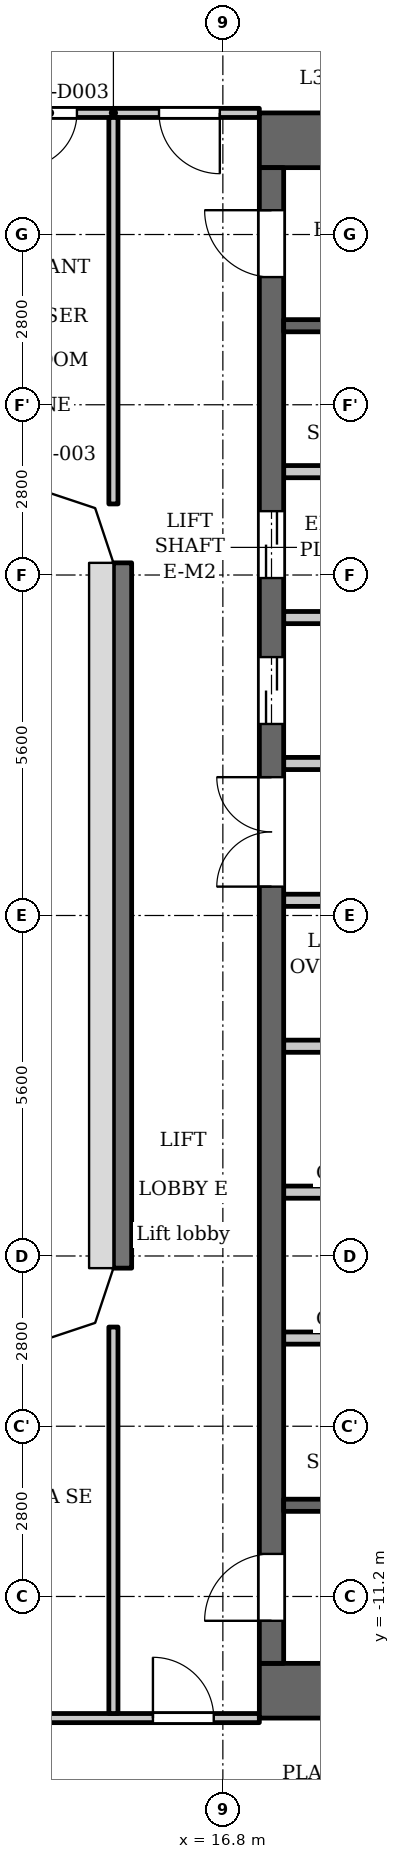
"""IFC4 building model, lengths in metres.
Left out: names, types, materials, properties, quantities, classifications, styles, units other than length and angle.
Written with IfcOpenShell. Run it as: python <this file> out.ifc"""

import sys

from ifc_helpers import new_model, si_unit, direction, frame, frame_2d, origin, place, context, subcontext, project, spatial, polyline, rectangle, outline, extrude, element, fill, save


model = new_model("IFC4")
c1 = context("Model", 3, precision=1e-05, world=origin(), true_north=direction((0.0, 1.0)))
c2 = subcontext(c1, "Body", "Model", "MODEL_VIEW")
j1 = project(units=[si_unit("LENGTHUNIT", "METRE"), si_unit("PLANEANGLEUNIT", "RADIAN")], contexts=[c1])
p1 = place(None, origin())
s1 = spatial("IfcSite", under=j1, at=p1, CompositionType="ELEMENT")
p2 = place(p1, origin())
s2 = spatial("IfcBuilding", under=s1, at=p2, CompositionType="ELEMENT")
p3 = place(p2, frame((0.0, 0.0, 130.7)))
s3 = spatial("IfcBuildingStorey", under=s2, at=p3, CompositionType="ELEMENT", Elevation=130.7)
p4 = place(p3, frame((15.15, 5.8, 0.0), z_axis=(0.0, 0.0, 1.0), x_axis=(0.0, -1.0, 0.0)))
e1 = element("IfcWall", 1, at=p4, inside=s3, PredefinedType="SOLIDWALL", context=c2, shape_type="SweptSolid", body=[
    extrude(rectangle(XDim=11.6, YDim=0.3, at=frame_2d((5.8, 0.0))), origin(), (0.0, 0.0, 1.0), 5.1),
])
for number, where, z_axis, x_axis in (
    (2, (17.4, 12.75, 0.0), (0.0, 0.0, 1.0), (1.0, 0.0, 0.0)),
    (3, (17.4, -12.75, 0.0), (0.0, 0.0, 1.0), (1.0, 0.0, 0.0)),
):
    element("IfcWall", number, at=place(p3, frame(where, z_axis=z_axis, x_axis=x_axis)), inside=s3, PredefinedType="SHEAR", context=c2, shape_type="SweptSolid", body=[
        extrude(rectangle(XDim=10.4, YDim=0.9, at=frame_2d((5.2, 0.0))), origin(), (0.0, 0.0, 1.0), 5.1),
    ])
p5 = place(p3, frame((17.6, -12.3, 0.0), z_axis=(0.0, 0.0, 1.0), x_axis=(0.0, 1.0, 0.0)))
e4 = element("IfcWall", 4, at=p5, inside=s3, PredefinedType="SHEAR", context=c2, shape_type="SweptSolid", body=[
    extrude(rectangle(XDim=24.6, YDim=0.4, at=frame_2d((12.3, 0.0))), origin(), (0.0, 0.0, 1.0), 5.1),
])
p6 = place(p5, frame((15.45, 0.0, 0.0)))
e5 = element("IfcOpeningElement", 5, at=p6, cuts=e4, PredefinedType="OPENING", context=c2, shape_type="SweptSolid", body=[
    extrude(rectangle(XDim=1.1, YDim=2.1, at=frame_2d((0.55, 1.05))), frame((0.0, 0.21, 0.0), z_axis=(0.0, -1.0, 0.0), x_axis=(1.0, 0.0, 0.0)), (0.0, 0.0, 1.0), 0.42),
])
p7 = place(p5, frame((17.85, 0.0, 0.0)))
e6 = element("IfcOpeningElement", 6, at=p7, cuts=e4, PredefinedType="OPENING", context=c2, shape_type="SweptSolid", body=[
    extrude(rectangle(XDim=1.1, YDim=2.1, at=frame_2d((0.55, 1.05))), frame((0.0, 0.21, 0.0), z_axis=(0.0, -1.0, 0.0), x_axis=(1.0, 0.0, 0.0)), (0.0, 0.0, 1.0), 0.42),
])
p8 = place(p5, frame((22.8, 0.0, 0.0)))
e7 = element("IfcOpeningElement", 7, at=p8, cuts=e4, PredefinedType="OPENING", context=c2, shape_type="SweptSolid", body=[
    extrude(rectangle(XDim=1.1, YDim=2.1, at=frame_2d((0.55, 1.05))), frame((0.0, 0.21, 0.0), z_axis=(0.0, -1.0, 0.0), x_axis=(1.0, 0.0, 0.0)), (0.0, 0.0, 1.0), 0.42),
])
p9 = place(p5, frame((0.7, 0.0, 0.0)))
e8 = element("IfcOpeningElement", 8, at=p9, cuts=e4, PredefinedType="OPENING", context=c2, shape_type="SweptSolid", body=[
    extrude(rectangle(XDim=1.1, YDim=2.1, at=frame_2d((0.55, 1.05))), frame((0.0, 0.21, 0.0), z_axis=(0.0, -1.0, 0.0), x_axis=(1.0, 0.0, 0.0)), (0.0, 0.0, 1.0), 0.42),
])
p10 = place(p5, frame((12.775, 0.0, 0.0)))
e9 = element("IfcOpeningElement", 9, at=p10, cuts=e4, PredefinedType="OPENING", context=c2, shape_type="SweptSolid", body=[
    extrude(rectangle(XDim=1.8, YDim=2.1, at=frame_2d((0.9, 1.05))), frame((0.0, 0.21, 0.0), z_axis=(0.0, -1.0, 0.0), x_axis=(1.0, 0.0, 0.0)), (0.0, 0.0, 1.0), 0.42),
])
p11 = place(p3, frame((17.8, -9.7, 0.0), z_axis=(0.0, 0.0, 1.0), x_axis=(1.0, 0.0, 0.0)))
e10 = element("IfcWall", 10, at=p11, inside=s3, PredefinedType="SHEAR", context=c2, shape_type="SweptSolid", body=[
    extrude(rectangle(XDim=8.3, YDim=0.2, at=frame_2d((4.15, 0.0))), origin(), (0.0, 0.0, 1.0), 5.1),
])
p12 = place(p11, frame((0.85, 0.0, 0.0)))
e11 = element("IfcOpeningElement", 11, at=p12, cuts=e10, PredefinedType="OPENING", context=c2, shape_type="SweptSolid", body=[
    extrude(rectangle(XDim=1.1, YDim=2.1, at=frame_2d((0.55, 1.05))), frame((0.0, 0.11, 0.0), z_axis=(0.0, -1.0, 0.0), x_axis=(1.0, 0.0, 0.0)), (0.0, 0.0, 1.0), 0.22),
])
p13 = place(p11, frame((3.75, 0.0, 0.0)))
e12 = element("IfcOpeningElement", 12, at=p13, cuts=e10, PredefinedType="OPENING", context=c2, shape_type="SweptSolid", body=[
    extrude(rectangle(XDim=1.1, YDim=2.1, at=frame_2d((0.55, 1.05))), frame((0.0, 0.11, 0.0), z_axis=(0.0, -1.0, 0.0), x_axis=(1.0, 0.0, 0.0)), (0.0, 0.0, 1.0), 0.22),
])
for number, where, z_axis, x_axis in (
    (13, (17.8, -6.95, 0.0), (0.0, 0.0, 1.0), (1.0, 0.0, 0.0)),
    (14, (17.8, -4.55, 0.0), (0.0, 0.0, 1.0), (1.0, 0.0, 0.0)),
    (15, (17.8, -2.15, 0.0), (0.0, 0.0, 1.0), (1.0, 0.0, 0.0)),
):
    element("IfcWall", number, at=place(p3, frame(where, z_axis=z_axis, x_axis=x_axis)), inside=s3, PredefinedType="PARTITIONING", context=c2, shape_type="SweptSolid", body=[
        extrude(rectangle(XDim=2.8, YDim=0.2, at=frame_2d((1.4, 0.0))), origin(), (0.0, 0.0, 1.0), 5.1),
    ])
for number, where, z_axis, x_axis in (
    (16, (17.8, 0.25, 0.0), (0.0, 0.0, 1.0), (1.0, 0.0, 0.0)),
    (17, (17.8, 2.5, 0.0), (0.0, 0.0, 1.0), (1.0, 0.0, 0.0)),
):
    element("IfcWall", number, at=place(p3, frame(where, z_axis=z_axis, x_axis=x_axis)), inside=s3, PredefinedType="PARTITIONING", context=c2, shape_type="SweptSolid", body=[
        extrude(rectangle(XDim=3.0, YDim=0.2, at=frame_2d((1.5, 0.0))), origin(), (0.0, 0.0, 1.0), 5.1),
    ])
for number, where, z_axis, x_axis in (
    (18, (17.8, 4.9, 0.0), (0.0, 0.0, 1.0), (1.0, 0.0, 0.0)),
    (19, (17.8, 7.3, 0.0), (0.0, 0.0, 1.0), (1.0, 0.0, 0.0)),
):
    element("IfcWall", number, at=place(p3, frame(where, z_axis=z_axis, x_axis=x_axis)), inside=s3, PredefinedType="PARTITIONING", context=c2, shape_type="SweptSolid", body=[
        extrude(rectangle(XDim=2.8, YDim=0.2, at=frame_2d((1.4, 0.0))), origin(), (0.0, 0.0, 1.0), 5.1),
    ])
p14 = place(p3, frame((17.8, 9.7, 0.0), z_axis=(0.0, 0.0, 1.0), x_axis=(1.0, 0.0, 0.0)))
e20 = element("IfcWall", 20, at=p14, inside=s3, PredefinedType="SHEAR", context=c2, shape_type="SweptSolid", body=[
    extrude(rectangle(XDim=8.3, YDim=0.2, at=frame_2d((4.15, 0.0))), origin(), (0.0, 0.0, 1.0), 5.1),
])
p15 = place(p14, frame((0.85, 0.0, 0.0)))
e21 = element("IfcOpeningElement", 21, at=p15, cuts=e20, PredefinedType="OPENING", context=c2, shape_type="SweptSolid", body=[
    extrude(rectangle(XDim=1.1, YDim=2.1, at=frame_2d((0.55, 1.05))), frame((0.0, 0.11, 0.0), z_axis=(0.0, -1.0, 0.0), x_axis=(1.0, 0.0, 0.0)), (0.0, 0.0, 1.0), 0.22),
])
p16 = place(p14, frame((3.75, 0.0, 0.0)))
e22 = element("IfcOpeningElement", 22, at=p16, cuts=e20, PredefinedType="OPENING", context=c2, shape_type="SweptSolid", body=[
    extrude(rectangle(XDim=1.1, YDim=2.1, at=frame_2d((0.55, 1.05))), frame((0.0, 0.11, 0.0), z_axis=(0.0, -1.0, 0.0), x_axis=(1.0, 0.0, 0.0)), (0.0, 0.0, 1.0), 0.22),
])
p17 = place(p3, frame((11.52, -13.2, 0.0), z_axis=(0.0, 0.0, 1.0), x_axis=(1.0, 0.0, 0.0)))
e23 = element("IfcWall", 23, at=p17, inside=s3, PredefinedType="PARTITIONING", context=c2, shape_type="SweptSolid", body=[
    extrude(rectangle(XDim=5.88, YDim=0.15, at=frame_2d((2.94, 0.0))), origin(), (0.0, 0.0, 1.0), 5.1),
])
p18 = place(p17, frame((4.13, 0.0, 0.0)))
e24 = element("IfcOpeningElement", 24, at=p18, cuts=e23, PredefinedType="OPENING", context=c2, shape_type="SweptSolid", body=[
    extrude(rectangle(XDim=1.0, YDim=2.1, at=frame_2d((0.5, 1.05))), frame((0.0, 0.085, 0.0), z_axis=(0.0, -1.0, 0.0), x_axis=(1.0, 0.0, 0.0)), (0.0, 0.0, 1.0), 0.17),
])
p19 = place(p17, frame((0.38, 0.0, 0.0)))
e25 = element("IfcOpeningElement", 25, at=p19, cuts=e23, PredefinedType="OPENING", context=c2, shape_type="SweptSolid", body=[
    extrude(rectangle(XDim=1.2, YDim=2.1, at=frame_2d((0.6, 1.05))), frame((0.0, 0.085, 0.0), z_axis=(0.0, -1.0, 0.0), x_axis=(1.0, 0.0, 0.0)), (0.0, 0.0, 1.0), 0.17),
])
p20 = place(p3, frame((11.52, 13.2, 0.0), z_axis=(0.0, 0.0, 1.0), x_axis=(1.0, 0.0, 0.0)))
e26 = element("IfcWall", 26, at=p20, inside=s3, PredefinedType="PARTITIONING", context=c2, shape_type="SweptSolid", body=[
    extrude(rectangle(XDim=5.88, YDim=0.15, at=frame_2d((2.94, 0.0))), origin(), (0.0, 0.0, 1.0), 5.1),
])
p21 = place(p20, frame((4.23, 0.0, 0.0)))
e27 = element("IfcOpeningElement", 27, at=p21, cuts=e26, PredefinedType="OPENING", context=c2, shape_type="SweptSolid", body=[
    extrude(rectangle(XDim=1.0, YDim=2.1, at=frame_2d((0.5, 1.05))), frame((0.0, 0.085, 0.0), z_axis=(0.0, -1.0, 0.0), x_axis=(1.0, 0.0, 0.0)), (0.0, 0.0, 1.0), 0.17),
])
p22 = place(p20, frame((0.17, 0.0, 0.0)))
e28 = element("IfcOpeningElement", 28, at=p22, cuts=e26, PredefinedType="OPENING", context=c2, shape_type="SweptSolid", body=[
    extrude(rectangle(XDim=0.9, YDim=2.1, at=frame_2d((0.45, 1.05))), frame((0.0, 0.085, 0.0), z_axis=(0.0, -1.0, 0.0), x_axis=(1.0, 0.0, 0.0)), (0.0, 0.0, 1.0), 0.17),
])
p23 = place(p20, frame((1.98, 0.0, 0.0)))
e29 = element("IfcOpeningElement", 29, at=p23, cuts=e26, PredefinedType="OPENING", context=c2, shape_type="SweptSolid", body=[
    extrude(rectangle(XDim=0.9, YDim=2.1, at=frame_2d((0.45, 1.05))), frame((0.0, 0.085, 0.0), z_axis=(0.0, -1.0, 0.0), x_axis=(1.0, 0.0, 0.0)), (0.0, 0.0, 1.0), 0.17),
])
for number, where, z_axis, x_axis in (
    (30, (15.0, -13.125, 0.0), (0.0, 0.0, 1.0), (0.0, 1.0, 0.0)),
    (31, (15.0, 6.769, 0.0), (0.0, 0.0, 1.0), (0.0, 1.0, 0.0)),
):
    element("IfcWall", number, at=place(p3, frame(where, z_axis=z_axis, x_axis=x_axis)), inside=s3, PredefinedType="PARTITIONING", context=c2, shape_type="SweptSolid", body=[
        extrude(rectangle(XDim=6.356, YDim=0.15, at=frame_2d((3.178, 0.0))), origin(), (0.0, 0.0, 1.0), 5.1),
    ])
p24 = place(p3, origin())
e32 = element("IfcWall", 32, at=p24, inside=s3, PredefinedType="SOLIDWALL", context=c2, shape_type="SweptSolid", body=[
    extrude(outline(polyline([(13.8, 7.0), (14.7, 6.7), (15.0, 5.8), (15.3, 5.8), (15.3, 5.849), (14.937, 6.937), (13.849, 7.3), (13.8, 7.3), (13.8, 7.0)])), origin(), (0.0, 0.0, 1.0), 5.1),
])
e33 = element("IfcWall", 33, at=p24, inside=s3, PredefinedType="SOLIDWALL", context=c2, shape_type="SweptSolid", body=[
    extrude(outline(polyline([(15.0, -5.8), (14.7, -6.7), (13.8, -7.0), (13.8, -7.3), (13.849, -7.3), (14.937, -6.937), (15.3, -5.849), (15.3, -5.8), (15.0, -5.8)])), origin(), (0.0, 0.0, 1.0), 5.1),
])
p25 = place(p6, origin())
e34 = element("IfcDoor", 34, at=p25, inside=s3, OperationType="DOUBLE_DOOR_SLIDING", PredefinedType="DOOR", context=c2, shape_type="SweptSolid", body=[
    extrude(rectangle(XDim=1.1, YDim=2.1, at=frame_2d((0.55, 1.05))), frame((0.0, 0.025, 0.0), z_axis=(0.0, -1.0, 0.0), x_axis=(1.0, 0.0, 0.0)), (0.0, 0.0, 1.0), 0.05),
])
fill(e5, e34)
p26 = place(p7, origin())
e35 = element("IfcDoor", 35, at=p26, inside=s3, OperationType="DOUBLE_DOOR_SLIDING", PredefinedType="DOOR", context=c2, shape_type="SweptSolid", body=[
    extrude(rectangle(XDim=1.1, YDim=2.1, at=frame_2d((0.55, 1.05))), frame((0.0, 0.025, 0.0), z_axis=(0.0, -1.0, 0.0), x_axis=(1.0, 0.0, 0.0)), (0.0, 0.0, 1.0), 0.05),
])
fill(e6, e35)
p27 = place(p8, origin())
e36 = element("IfcDoor", 36, at=p27, inside=s3, OperationType="SINGLE_SWING_LEFT", PredefinedType="DOOR", context=c2, shape_type="SweptSolid", body=[
    extrude(rectangle(XDim=1.1, YDim=2.1, at=frame_2d((0.55, 1.05))), frame((0.0, 0.025, 0.0), z_axis=(0.0, -1.0, 0.0), x_axis=(1.0, 0.0, 0.0)), (0.0, 0.0, 1.0), 0.05),
])
fill(e7, e36)
p28 = place(p9, origin())
e37 = element("IfcDoor", 37, at=p28, inside=s3, OperationType="SINGLE_SWING_RIGHT", PredefinedType="DOOR", context=c2, shape_type="SweptSolid", body=[
    extrude(rectangle(XDim=1.1, YDim=2.1, at=frame_2d((0.55, 1.05))), frame((0.0, 0.025, 0.0), z_axis=(0.0, -1.0, 0.0), x_axis=(1.0, 0.0, 0.0)), (0.0, 0.0, 1.0), 0.05),
])
fill(e8, e37)
p29 = place(p10, origin())
e38 = element("IfcDoor", 38, at=p29, inside=s3, OperationType="DOUBLE_DOOR_SINGLE_SWING", PredefinedType="DOOR", context=c2, shape_type="SweptSolid", body=[
    extrude(rectangle(XDim=1.8, YDim=2.1, at=frame_2d((0.9, 1.05))), frame((0.0, 0.025, 0.0), z_axis=(0.0, -1.0, 0.0), x_axis=(1.0, 0.0, 0.0)), (0.0, 0.0, 1.0), 0.05),
])
fill(e9, e38)
p30 = place(p21, origin())
e39 = element("IfcDoor", 39, at=p30, inside=s3, OperationType="SINGLE_SWING_RIGHT", PredefinedType="DOOR", context=c2, shape_type="SweptSolid", body=[
    extrude(rectangle(XDim=1.0, YDim=2.1, at=frame_2d((0.5, 1.05))), frame((0.0, 0.025, 0.0), z_axis=(0.0, -1.0, 0.0), x_axis=(1.0, 0.0, 0.0)), (0.0, 0.0, 1.0), 0.05),
])
fill(e27, e39)
p31 = place(p23, origin())
e40 = element("IfcDoor", 40, at=p31, inside=s3, OperationType="SINGLE_SWING_LEFT", PredefinedType="DOOR", context=c2, shape_type="SweptSolid", body=[
    extrude(rectangle(XDim=0.9, YDim=2.1, at=frame_2d((0.45, 1.05))), frame((0.0, 0.025, 0.0), z_axis=(0.0, -1.0, 0.0), x_axis=(1.0, 0.0, 0.0)), (0.0, 0.0, 1.0), 0.05),
])
fill(e29, e40)
p32 = place(p18, origin())
e41 = element("IfcDoor", 41, at=p32, inside=s3, OperationType="SINGLE_SWING_RIGHT", PredefinedType="DOOR", context=c2, shape_type="SweptSolid", body=[
    extrude(rectangle(XDim=1.0, YDim=2.1, at=frame_2d((0.5, 1.05))), frame((0.0, 0.025, 0.0), z_axis=(0.0, -1.0, 0.0), x_axis=(1.0, 0.0, 0.0)), (0.0, 0.0, 1.0), 0.05),
])
fill(e24, e41)
save(model, sys.argv[1])
